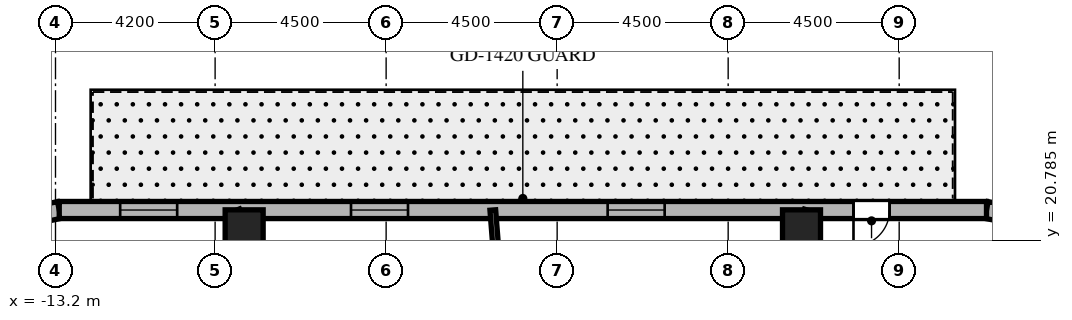
"""IFC4 building model, lengths in metres.
Left out: names, types, materials, properties, quantities, classifications, styles, units other than length and angle.
Written with IfcOpenShell. Run it as: python <this file> out.ifc"""

import sys

from ifc_helpers import new_model, si_unit, direction, frame, frame_2d, origin, origin_2d, place, context, subcontext, project, spatial, rectangle, extrude, element, fill, save


model = new_model("IFC4")
c1 = context("Model", 3, precision=1e-05, world=origin(), true_north=direction((0.0, 1.0)))
c2 = subcontext(c1, "Body", "Model", "MODEL_VIEW")
j1 = project(units=[si_unit("LENGTHUNIT", "METRE"), si_unit("PLANEANGLEUNIT", "RADIAN")], contexts=[c1])
p1 = place(None, origin())
s1 = spatial("IfcSite", under=j1, at=p1, CompositionType="ELEMENT")
p2 = place(p1, origin())
s2 = spatial("IfcBuilding", under=s1, at=p2, CompositionType="ELEMENT")
p3 = place(p2, frame((0.0, 0.0, 244.5)))
s3 = spatial("IfcBuildingStorey", under=s2, at=p3, CompositionType="ELEMENT", Elevation=244.5)
for number, where, z_axis, x_axis in (
    (1, (6.43, 21.08, 0.0), (0.0, 0.0, 1.0), (1.0, 0.0, 0.0)),
    (2, (-8.236, 21.08, 0.0), (0.0, 0.0, 1.0), (1.0, 0.0, 0.0)),
):
    element("IfcColumn", number, at=place(p3, frame(where, z_axis=z_axis, x_axis=x_axis)), inside=s3, PredefinedType="COLUMN", context=c2, shape_type="SweptSolid", body=[
        extrude(rectangle(XDim=1.0, YDim=1.0, at=origin_2d()), origin(), (0.0, 0.0, 1.0), 3.8),
    ])
p4 = place(p3, frame((12.546, 21.34, 0.0), z_axis=(0.0, 0.0, 1.0), x_axis=(-0.982686750835, 0.18527479519, 0.0)))
e3 = element("IfcWall", 3, at=p4, inside=s3, PredefinedType="SOLIDWALL", context=c2, shape_type="SweptSolid", body=[
    extrude(rectangle(XDim=1.27, YDim=0.45, at=frame_2d((0.635, 0.0))), origin(), (0.0, 0.0, 1.0), 3.5),
])
p5 = place(p3, frame((-13.102, 21.575, 0.0), z_axis=(0.0, 0.0, 1.0), x_axis=(-0.978757421505, -0.205021730188, 0.0)))
e4 = element("IfcWall", 4, at=p5, inside=s3, PredefinedType="SOLIDWALL", context=c2, shape_type="SweptSolid", body=[
    extrude(rectangle(XDim=1.406, YDim=0.45, at=frame_2d((0.703, 0.0))), origin(), (0.0, 0.0, 1.0), 3.5),
])
p6 = place(p3, frame((11.298, 21.575, 0.0), z_axis=(0.0, 0.0, 1.0), x_axis=(-1.0, 0.0, 0.0)))
e5 = element("IfcWall", 5, at=p6, inside=s3, PredefinedType="SOLIDWALL", context=c2, shape_type="SweptSolid", body=[
    extrude(rectangle(XDim=24.399, YDim=0.45, at=frame_2d((12.2, 0.0))), origin(), (0.0, 0.0, 1.0), 3.5),
])
p7 = place(p6, frame((2.55, 0.0, 0.0)))
e6 = element("IfcOpeningElement", 6, at=p7, cuts=e5, PredefinedType="OPENING", context=c2, shape_type="SweptSolid", body=[
    extrude(rectangle(XDim=0.95, YDim=2.15, at=frame_2d((0.475, 1.075))), frame((0.0, 0.235, 0.0), z_axis=(0.0, -1.0, 0.0), x_axis=(1.0, 0.0, 0.0)), (0.0, 0.0, 1.0), 0.47),
])
p8 = place(p6, frame((8.469, 0.0, 0.8)))
e7 = element("IfcOpeningElement", 7, at=p8, cuts=e5, PredefinedType="OPENING", context=c2, shape_type="SweptSolid", body=[
    extrude(rectangle(XDim=1.5, YDim=1.8, at=frame_2d((0.75, 0.9))), frame((0.0, 0.235, 0.0), z_axis=(0.0, -1.0, 0.0), x_axis=(1.0, 0.0, 0.0)), (0.0, 0.0, 1.0), 0.47),
])
p9 = place(p6, frame((15.222, 0.0, 0.8)))
e8 = element("IfcOpeningElement", 8, at=p9, cuts=e5, PredefinedType="OPENING", context=c2, shape_type="SweptSolid", body=[
    extrude(rectangle(XDim=1.5, YDim=1.8, at=frame_2d((0.75, 0.9))), frame((0.0, 0.235, 0.0), z_axis=(0.0, -1.0, 0.0), x_axis=(1.0, 0.0, 0.0)), (0.0, 0.0, 1.0), 0.47),
])
p10 = place(p6, frame((21.296, 0.0, 0.8)))
e9 = element("IfcOpeningElement", 9, at=p10, cuts=e5, PredefinedType="OPENING", context=c2, shape_type="SweptSolid", body=[
    extrude(rectangle(XDim=1.5, YDim=1.8, at=frame_2d((0.75, 0.9))), frame((0.0, 0.235, 0.0), z_axis=(0.0, -1.0, 0.0), x_axis=(1.0, 0.0, 0.0)), (0.0, 0.0, 1.0), 0.47),
])
p11 = place(p3, frame((3.004, 9.85, 0.0), z_axis=(0.0, 0.0, 1.0), x_axis=(0.291775760688, 0.956486751333, 0.0)))
e10 = element("IfcWall", 10, at=p11, inside=s3, PredefinedType="PARTITIONING", context=c2, shape_type="SweptSolid", body=[
    extrude(rectangle(XDim=12.258, YDim=0.15, at=frame_2d((6.129, 0.0))), origin(), (0.0, 0.0, 1.0), 2.74),
])
p12 = place(p3, frame((-1.1, 14.018, 0.0), z_axis=(0.0, 0.0, 1.0), x_axis=(-0.078228275349, 0.996935472804, 0.0)))
e11 = element("IfcWall", 11, at=p12, inside=s3, PredefinedType="PARTITIONING", context=c2, shape_type="SweptSolid", body=[
    extrude(rectangle(XDim=7.581, YDim=0.15, at=frame_2d((3.79, 0.0))), origin(), (0.0, 0.0, 1.0), 2.74),
])
p13 = place(p3, frame((-3.848, 9.85, 0.0), z_axis=(0.0, 0.0, 1.0), x_axis=(-0.363921778212, 0.931429513889, 0.0)))
e12 = element("IfcWall", 12, at=p13, inside=s3, PredefinedType="PARTITIONING", context=c2, shape_type="SweptSolid", body=[
    extrude(rectangle(XDim=12.588, YDim=0.15, at=frame_2d((6.294, 0.0))), origin(), (0.0, 0.0, 1.0), 2.74),
])
p14 = place(p7, origin())
e13 = element("IfcDoor", 13, at=p14, inside=s3, OperationType="SINGLE_SWING_RIGHT", PredefinedType="DOOR", context=c2, shape_type="SweptSolid", body=[
    extrude(rectangle(XDim=0.95, YDim=2.15, at=frame_2d((0.475, 1.075))), frame((0.0, 0.025, 0.0), z_axis=(0.0, -1.0, 0.0), x_axis=(1.0, 0.0, 0.0)), (0.0, 0.0, 1.0), 0.05),
])
fill(e6, e13)
p15 = place(p8, origin())
e14 = element("IfcWindow", 14, at=p15, inside=s3, PartitioningType="SINGLE_PANEL", PredefinedType="WINDOW", context=c2, shape_type="SweptSolid", body=[
    extrude(rectangle(XDim=1.5, YDim=1.8, at=frame_2d((0.75, 0.9))), frame((0.0, 0.03, 0.0), z_axis=(0.0, -1.0, 0.0), x_axis=(1.0, 0.0, 0.0)), (0.0, 0.0, 1.0), 0.06),
])
fill(e7, e14)
p16 = place(p9, origin())
e15 = element("IfcWindow", 15, at=p16, inside=s3, PartitioningType="SINGLE_PANEL", PredefinedType="WINDOW", context=c2, shape_type="SweptSolid", body=[
    extrude(rectangle(XDim=1.5, YDim=1.8, at=frame_2d((0.75, 0.9))), frame((0.0, 0.03, 0.0), z_axis=(0.0, -1.0, 0.0), x_axis=(1.0, 0.0, 0.0)), (0.0, 0.0, 1.0), 0.06),
])
fill(e8, e15)
p17 = place(p10, origin())
e16 = element("IfcWindow", 16, at=p17, inside=s3, PartitioningType="SINGLE_PANEL", PredefinedType="WINDOW", context=c2, shape_type="SweptSolid", body=[
    extrude(rectangle(XDim=1.5, YDim=1.8, at=frame_2d((0.75, 0.9))), frame((0.0, 0.03, 0.0), z_axis=(0.0, -1.0, 0.0), x_axis=(1.0, 0.0, 0.0)), (0.0, 0.0, 1.0), 0.06),
])
fill(e9, e16)
save(model, sys.argv[1])
